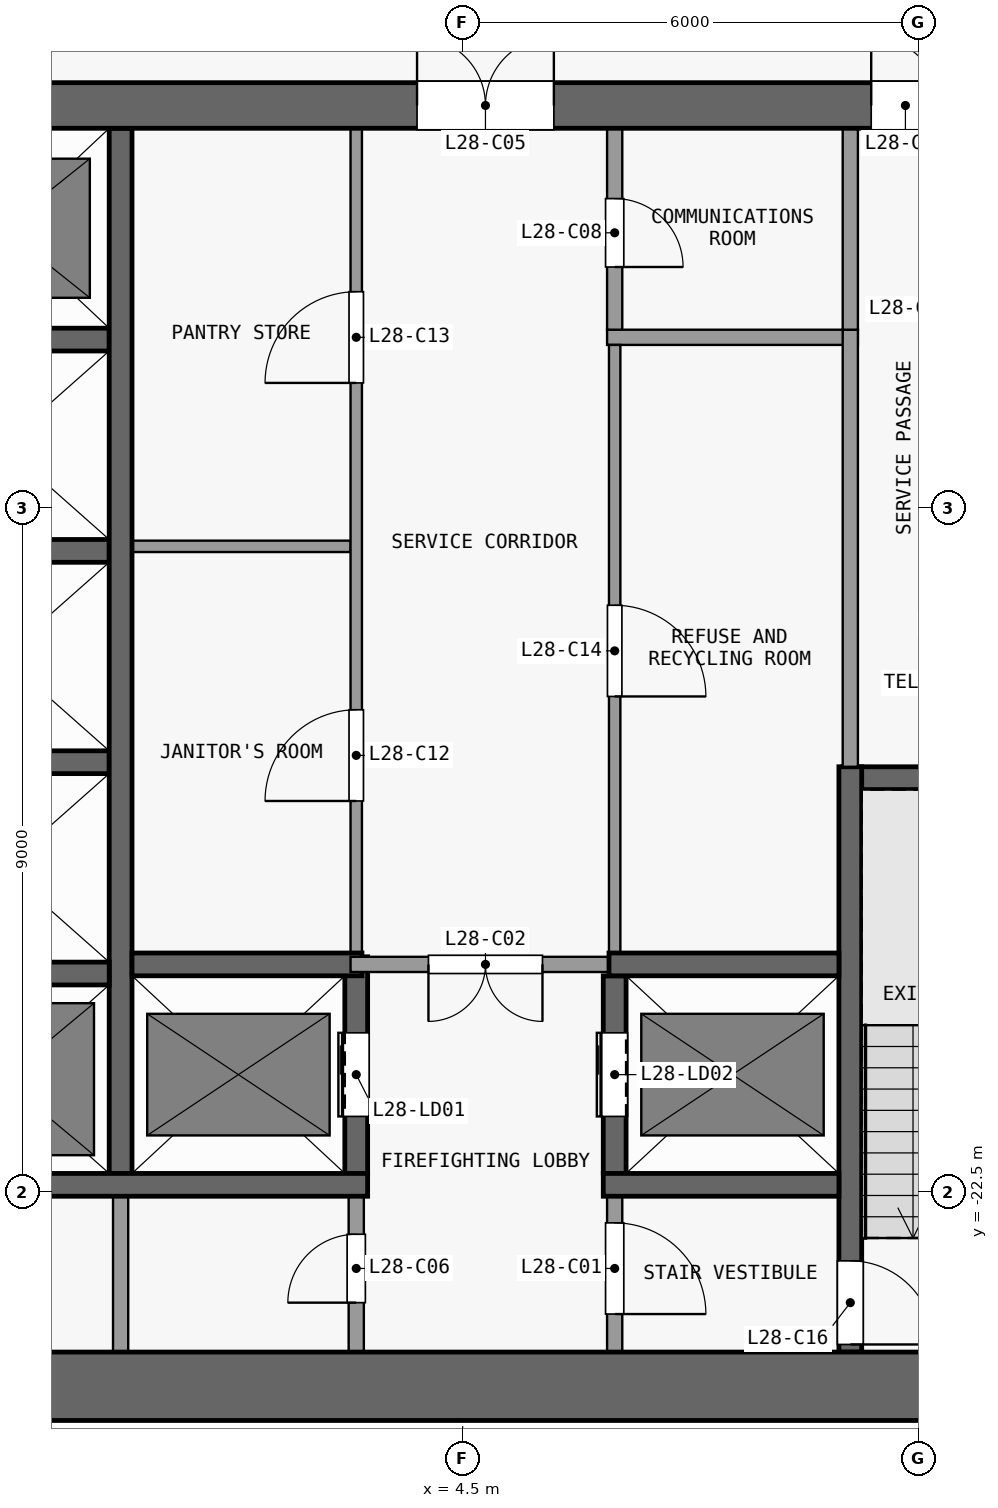
"""IFC4 building model, lengths in metres.
Left out: names, types, materials, properties, quantities, classifications, styles, units other than length and angle.
Written with IfcOpenShell. Run it as: python <this file> out.ifc"""

import sys

from ifc_helpers import new_model, si_unit, direction, frame, frame_2d, origin, place, context, subcontext, project, spatial, rectangle, extrude, element, fill, save


model = new_model("IFC4")
c1 = context("Model", 3, precision=1e-05, world=origin(), true_north=direction((0.0, 1.0)))
c2 = subcontext(c1, "Body", "Model", "MODEL_VIEW")
j1 = project(units=[si_unit("LENGTHUNIT", "METRE"), si_unit("PLANEANGLEUNIT", "RADIAN")], contexts=[c1])
p1 = place(None, origin())
s1 = spatial("IfcSite", under=j1, at=p1, CompositionType="ELEMENT")
p2 = place(p1, origin())
s2 = spatial("IfcBuilding", under=s1, at=p2, CompositionType="ELEMENT")
p3 = place(p2, frame((0.0, 0.0, 113.5)))
s3 = spatial("IfcBuildingStorey", under=s2, at=p3, CompositionType="ELEMENT", Elevation=113.5)
p4 = place(p3, frame((-13.4, -25.05, 0.0), z_axis=(0.0, 0.0, 1.0), x_axis=(1.0, 0.0, 0.0)))
e1 = element("IfcWall", 1, at=p4, inside=s3, PredefinedType="SHEAR", context=c2, shape_type="SweptSolid", body=[
    extrude(rectangle(XDim=26.8, YDim=0.9, at=frame_2d((13.4, 0.0))), origin(), (0.0, 0.0, 1.0), 3.3),
])
p5 = place(p3, frame((-13.4, -8.2, 0.0), z_axis=(0.0, 0.0, 1.0), x_axis=(1.0, 0.0, 0.0)))
e2 = element("IfcWall", 2, at=p5, inside=s3, PredefinedType="SHEAR", context=c2, shape_type="SweptSolid", body=[
    extrude(rectangle(XDim=26.8, YDim=0.6, at=frame_2d((13.4, 0.0))), origin(), (0.0, 0.0, 1.0), 3.3),
])
p6 = place(p5, frame((7.7, 0.0, 0.0)))
e3 = element("IfcOpeningElement", 3, at=p6, cuts=e2, PredefinedType="OPENING", context=c2, shape_type="SweptSolid", body=[
    extrude(rectangle(XDim=1.8, YDim=2.1, at=frame_2d((0.9, 1.05))), frame((0.0, 0.31, 0.0), z_axis=(0.0, -1.0, 0.0), x_axis=(1.0, 0.0, 0.0)), (0.0, 0.0, 1.0), 0.62),
])
p7 = place(p5, frame((17.3, 0.0, 0.0)))
e4 = element("IfcOpeningElement", 4, at=p7, cuts=e2, PredefinedType="OPENING", context=c2, shape_type="SweptSolid", body=[
    extrude(rectangle(XDim=1.8, YDim=2.1, at=frame_2d((0.9, 1.05))), frame((0.0, 0.31, 0.0), z_axis=(0.0, -1.0, 0.0), x_axis=(1.0, 0.0, 0.0)), (0.0, 0.0, 1.0), 0.62),
])
p8 = place(p5, frame((1.625, 0.0, 0.0)))
e5 = element("IfcOpeningElement", 5, at=p8, cuts=e2, PredefinedType="OPENING", context=c2, shape_type="SweptSolid", body=[
    extrude(rectangle(XDim=1.2, YDim=2.1, at=frame_2d((0.6, 1.05))), frame((0.0, 0.31, 0.0), z_axis=(0.0, -1.0, 0.0), x_axis=(1.0, 0.0, 0.0)), (0.0, 0.0, 1.0), 0.62),
])
p9 = place(p5, frame((23.275, 0.0, 0.0)))
e6 = element("IfcOpeningElement", 6, at=p9, cuts=e2, PredefinedType="OPENING", context=c2, shape_type="SweptSolid", body=[
    extrude(rectangle(XDim=0.9, YDim=2.1, at=frame_2d((0.45, 1.05))), frame((0.0, 0.31, 0.0), z_axis=(0.0, -1.0, 0.0), x_axis=(1.0, 0.0, 0.0)), (0.0, 0.0, 1.0), 0.62),
])
p10 = place(p3, frame((-2.95, -22.4, 0.0), z_axis=(0.0, 0.0, 1.0), x_axis=(1.0, 0.0, 0.0)))
e7 = element("IfcWall", 7, at=p10, inside=s3, PredefinedType="SHEAR", context=c2, shape_type="SweptSolid", body=[
    extrude(rectangle(XDim=6.2, YDim=0.3, at=frame_2d((3.1, 0.0))), origin(), (0.0, 0.0, 1.0), 3.3),
])
p11 = place(p3, frame((6.35, -22.4, 0.0), z_axis=(0.0, 0.0, 1.0), x_axis=(1.0, 0.0, 0.0)))
e8 = element("IfcWall", 8, at=p11, inside=s3, PredefinedType="SHEAR", context=c2, shape_type="SweptSolid", body=[
    extrude(rectangle(XDim=3.1, YDim=0.3, at=frame_2d((1.55, 0.0))), origin(), (0.0, 0.0, 1.0), 3.3),
])
p12 = place(p3, frame((-2.95, -19.62, 0.0), z_axis=(0.0, 0.0, 1.0), x_axis=(1.0, 0.0, 0.0)))
e9 = element("IfcWall", 9, at=p12, inside=s3, PredefinedType="SHEAR", context=c2, shape_type="SweptSolid", body=[
    extrude(rectangle(XDim=2.8, YDim=0.3, at=frame_2d((1.4, 0.0))), origin(), (0.0, 0.0, 1.0), 3.3),
])
p13 = place(p3, frame((0.15, -19.5, 0.0), z_axis=(0.0, 0.0, 1.0), x_axis=(1.0, 0.0, 0.0)))
e10 = element("IfcWall", 10, at=p13, inside=s3, PredefinedType="SHEAR", context=c2, shape_type="SweptSolid", body=[
    extrude(rectangle(XDim=3.025, YDim=0.3, at=frame_2d((1.513, 0.0))), origin(), (0.0, 0.0, 1.0), 3.3),
])
p14 = place(p3, frame((6.575, -19.5, 0.0), z_axis=(0.0, 0.0, 1.0), x_axis=(-1.0, 0.0, 0.0)))
e11 = element("IfcWall", 11, at=p14, inside=s3, PredefinedType="PARTITIONING", context=c2, shape_type="SweptSolid", body=[
    extrude(rectangle(XDim=3.55, YDim=0.2, at=frame_2d((1.775, 0.0))), origin(), (0.0, 0.0, 1.0), 3.3),
])
p15 = place(p14, frame((1.025, 0.0, 0.0)))
e12 = element("IfcOpeningElement", 12, at=p15, cuts=e11, PredefinedType="OPENING", context=c2, shape_type="SweptSolid", body=[
    extrude(rectangle(XDim=1.5, YDim=2.1, at=frame_2d((0.75, 1.05))), frame((0.0, 0.11, 0.0), z_axis=(0.0, -1.0, 0.0), x_axis=(1.0, 0.0, 0.0)), (0.0, 0.0, 1.0), 0.22),
])
p16 = place(p3, frame((6.425, -19.5, 0.0), z_axis=(0.0, 0.0, 1.0), x_axis=(1.0, 0.0, 0.0)))
e13 = element("IfcWall", 13, at=p16, inside=s3, PredefinedType="SHEAR", context=c2, shape_type="SweptSolid", body=[
    extrude(rectangle(XDim=3.025, YDim=0.3, at=frame_2d((1.512, 0.0))), origin(), (0.0, 0.0, 1.0), 3.3),
])
p17 = place(p3, frame((9.5, -17.05, 0.0), z_axis=(0.0, 0.0, 1.0), x_axis=(1.0, 0.0, 0.0)))
e14 = element("IfcWall", 14, at=p17, inside=s3, PredefinedType="SHEAR", context=c2, shape_type="SweptSolid", body=[
    extrude(rectangle(XDim=3.1, YDim=0.3, at=frame_2d((1.55, 0.0))), origin(), (0.0, 0.0, 1.0), 3.3),
])
for number, where, z_axis, x_axis in (
    (15, (-2.95, -16.84, 0.0), (0.0, 0.0, 1.0), (1.0, 0.0, 0.0)),
    (16, (-2.95, -14.06, 0.0), (0.0, 0.0, 1.0), (1.0, 0.0, 0.0)),
):
    element("IfcWall", number, at=place(p3, frame(where, z_axis=z_axis, x_axis=x_axis)), inside=s3, PredefinedType="SHEAR", context=c2, shape_type="SweptSolid", body=[
        extrude(rectangle(XDim=2.8, YDim=0.3, at=frame_2d((1.4, 0.0))), origin(), (0.0, 0.0, 1.0), 3.3),
    ])
p18 = place(p3, frame((0.15, -14.0, 0.0), z_axis=(0.0, 0.0, 1.0), x_axis=(1.0, 0.0, 0.0)))
e17 = element("IfcWall", 17, at=p18, inside=s3, PredefinedType="PARTITIONING", context=c2, shape_type="SweptSolid", body=[
    extrude(rectangle(XDim=2.875, YDim=0.15, at=frame_2d((1.438, 0.0))), origin(), (0.0, 0.0, 1.0), 3.3),
])
p19 = place(p3, frame((-2.95, -11.28, 0.0), z_axis=(0.0, 0.0, 1.0), x_axis=(1.0, 0.0, 0.0)))
e18 = element("IfcWall", 18, at=p19, inside=s3, PredefinedType="SHEAR", context=c2, shape_type="SweptSolid", body=[
    extrude(rectangle(XDim=2.8, YDim=0.3, at=frame_2d((1.4, 0.0))), origin(), (0.0, 0.0, 1.0), 3.3),
])
p20 = place(p3, frame((6.4, -11.25, 0.0), z_axis=(0.0, 0.0, 1.0), x_axis=(1.0, 0.0, 0.0)))
e19 = element("IfcWall", 19, at=p20, inside=s3, PredefinedType="PARTITIONING", context=c2, shape_type="SweptSolid", body=[
    extrude(rectangle(XDim=3.3, YDim=0.2, at=frame_2d((1.65, 0.0))), origin(), (0.0, 0.0, 1.0), 3.3),
])
p21 = place(p3, frame((0.0, -24.6, 0.0), z_axis=(0.0, 0.0, 1.0), x_axis=(0.0, 1.0, 0.0)))
e20 = element("IfcWall", 20, at=p21, inside=s3, PredefinedType="PARTITIONING", context=c2, shape_type="SweptSolid", body=[
    extrude(rectangle(XDim=2.05, YDim=0.2, at=frame_2d((1.025, 0.0))), origin(), (0.0, 0.0, 1.0), 3.3),
])
p22 = place(p3, frame((0.0, -22.25, 0.0), z_axis=(0.0, 0.0, 1.0), x_axis=(0.0, 1.0, 0.0)))
e21 = element("IfcWall", 21, at=p22, inside=s3, PredefinedType="SHEAR", context=c2, shape_type="SweptSolid", body=[
    extrude(rectangle(XDim=13.75, YDim=0.3, at=frame_2d((6.875, 0.0))), origin(), (0.0, 0.0, 1.0), 3.3),
])
p23 = place(p3, frame((3.1, -24.6, 0.0), z_axis=(0.0, 0.0, 1.0), x_axis=(0.0, 1.0, 0.0)))
e22 = element("IfcWall", 22, at=p23, inside=s3, PredefinedType="PARTITIONING", context=c2, shape_type="SweptSolid", body=[
    extrude(rectangle(XDim=2.05, YDim=0.2, at=frame_2d((1.025, 0.0))), origin(), (0.0, 0.0, 1.0), 3.3),
])
p24 = place(p23, frame((0.65, 0.0, 0.0)))
e23 = element("IfcOpeningElement", 23, at=p24, cuts=e22, PredefinedType="OPENING", context=c2, shape_type="SweptSolid", body=[
    extrude(rectangle(XDim=0.9, YDim=2.1, at=frame_2d((0.45, 1.05))), frame((0.0, 0.11, 0.0), z_axis=(0.0, -1.0, 0.0), x_axis=(1.0, 0.0, 0.0)), (0.0, 0.0, 1.0), 0.22),
])
p25 = place(p3, frame((3.1, -22.25, 0.0), z_axis=(0.0, 0.0, 1.0), x_axis=(0.0, 1.0, 0.0)))
e24 = element("IfcWall", 24, at=p25, inside=s3, PredefinedType="SHEAR", context=c2, shape_type="SweptSolid", body=[
    extrude(rectangle(XDim=2.85, YDim=0.3, at=frame_2d((1.425, 0.0))), origin(), (0.0, 0.0, 1.0), 3.3),
])
p26 = place(p25, frame((0.75, 0.0, 0.0)))
e25 = element("IfcOpeningElement", 25, at=p26, cuts=e24, PredefinedType="OPENING", context=c2, shape_type="SweptSolid", body=[
    extrude(rectangle(XDim=1.1, YDim=2.1, at=frame_2d((0.55, 1.05))), frame((0.0, 0.16, 0.0), z_axis=(0.0, -1.0, 0.0), x_axis=(1.0, 0.0, 0.0)), (0.0, 0.0, 1.0), 0.32),
])
p27 = place(p3, frame((3.1, -19.4, 0.0), z_axis=(0.0, 0.0, 1.0), x_axis=(0.0, 1.0, 0.0)))
e26 = element("IfcWall", 26, at=p27, inside=s3, PredefinedType="PARTITIONING", context=c2, shape_type="SweptSolid", body=[
    extrude(rectangle(XDim=10.9, YDim=0.15, at=frame_2d((5.45, 0.0))), origin(), (0.0, 0.0, 1.0), 3.3),
])
p28 = place(p27, frame((2.05, 0.0, 0.0)))
e27 = element("IfcOpeningElement", 27, at=p28, cuts=e26, PredefinedType="OPENING", context=c2, shape_type="SweptSolid", body=[
    extrude(rectangle(XDim=1.2, YDim=2.1, at=frame_2d((0.6, 1.05))), frame((0.0, 0.085, 0.0), z_axis=(0.0, -1.0, 0.0), x_axis=(1.0, 0.0, 0.0)), (0.0, 0.0, 1.0), 0.17),
])
p29 = place(p27, frame((7.55, 0.0, 0.0)))
e28 = element("IfcOpeningElement", 28, at=p29, cuts=e26, PredefinedType="OPENING", context=c2, shape_type="SweptSolid", body=[
    extrude(rectangle(XDim=1.2, YDim=2.1, at=frame_2d((0.6, 1.05))), frame((0.0, 0.085, 0.0), z_axis=(0.0, -1.0, 0.0), x_axis=(1.0, 0.0, 0.0)), (0.0, 0.0, 1.0), 0.17),
])
p30 = place(p3, frame((6.5, -22.55, 0.0), z_axis=(0.0, 0.0, 1.0), x_axis=(0.0, -1.0, 0.0)))
e29 = element("IfcWall", 29, at=p30, inside=s3, PredefinedType="PARTITIONING", context=c2, shape_type="SweptSolid", body=[
    extrude(rectangle(XDim=2.05, YDim=0.2, at=frame_2d((1.025, 0.0))), origin(), (0.0, 0.0, 1.0), 3.3),
])
p31 = place(p30, frame((0.35, 0.0, 0.0)))
e30 = element("IfcOpeningElement", 30, at=p31, cuts=e29, PredefinedType="OPENING", context=c2, shape_type="SweptSolid", body=[
    extrude(rectangle(XDim=1.2, YDim=2.1, at=frame_2d((0.6, 1.05))), frame((0.0, 0.11, 0.0), z_axis=(0.0, -1.0, 0.0), x_axis=(1.0, 0.0, 0.0)), (0.0, 0.0, 1.0), 0.22),
])
p32 = place(p3, frame((6.5, -22.25, 0.0), z_axis=(0.0, 0.0, 1.0), x_axis=(0.0, 1.0, 0.0)))
e31 = element("IfcWall", 31, at=p32, inside=s3, PredefinedType="SHEAR", context=c2, shape_type="SweptSolid", body=[
    extrude(rectangle(XDim=2.6, YDim=0.3, at=frame_2d((1.3, 0.0))), origin(), (0.0, 0.0, 1.0), 3.3),
])
p33 = place(p32, frame((0.75, 0.0, 0.0)))
e32 = element("IfcOpeningElement", 32, at=p33, cuts=e31, PredefinedType="OPENING", context=c2, shape_type="SweptSolid", body=[
    extrude(rectangle(XDim=1.1, YDim=2.1, at=frame_2d((0.55, 1.05))), frame((0.0, 0.16, 0.0), z_axis=(0.0, -1.0, 0.0), x_axis=(1.0, 0.0, 0.0)), (0.0, 0.0, 1.0), 0.32),
])
p34 = place(p3, frame((6.5, -11.35, 0.0), z_axis=(0.0, 0.0, 1.0), x_axis=(0.0, -1.0, 0.0)))
e33 = element("IfcWall", 33, at=p34, inside=s3, PredefinedType="PARTITIONING", context=c2, shape_type="SweptSolid", body=[
    extrude(rectangle(XDim=8.0, YDim=0.15, at=frame_2d((4.0, 0.0))), origin(), (0.0, 0.0, 1.0), 3.3),
])
p35 = place(p34, frame((3.425, 0.0, 0.0)))
e34 = element("IfcOpeningElement", 34, at=p35, cuts=e33, PredefinedType="OPENING", context=c2, shape_type="SweptSolid", body=[
    extrude(rectangle(XDim=1.2, YDim=2.1, at=frame_2d((0.6, 1.05))), frame((0.0, 0.085, 0.0), z_axis=(0.0, -1.0, 0.0), x_axis=(1.0, 0.0, 0.0)), (0.0, 0.0, 1.0), 0.17),
])
p36 = place(p3, frame((6.5, -8.5, 0.0), z_axis=(0.0, 0.0, 1.0), x_axis=(0.0, -1.0, 0.0)))
e35 = element("IfcWall", 35, at=p36, inside=s3, PredefinedType="PARTITIONING", context=c2, shape_type="SweptSolid", body=[
    extrude(rectangle(XDim=2.65, YDim=0.2, at=frame_2d((1.325, 0.0))), origin(), (0.0, 0.0, 1.0), 3.3),
])
p37 = place(p36, frame((0.925, 0.0, 0.0)))
e36 = element("IfcOpeningElement", 36, at=p37, cuts=e35, PredefinedType="OPENING", context=c2, shape_type="SweptSolid", body=[
    extrude(rectangle(XDim=0.9, YDim=2.1, at=frame_2d((0.45, 1.05))), frame((0.0, 0.11, 0.0), z_axis=(0.0, -1.0, 0.0), x_axis=(1.0, 0.0, 0.0)), (0.0, 0.0, 1.0), 0.22),
])
p38 = place(p3, frame((9.6, -16.9, 0.0), z_axis=(0.0, 0.0, 1.0), x_axis=(0.0, -1.0, 0.0)))
e37 = element("IfcWall", 37, at=p38, inside=s3, PredefinedType="SHEAR", context=c2, shape_type="SweptSolid", body=[
    extrude(rectangle(XDim=7.7, YDim=0.3, at=frame_2d((3.85, 0.0))), origin(), (0.0, 0.0, 1.0), 3.3),
])
p39 = place(p38, frame((6.5, 0.0, 0.0)))
e38 = element("IfcOpeningElement", 38, at=p39, cuts=e37, PredefinedType="OPENING", context=c2, shape_type="SweptSolid", body=[
    extrude(rectangle(XDim=1.1, YDim=2.1, at=frame_2d((0.55, 1.05))), frame((0.0, 0.16, 0.0), z_axis=(0.0, -1.0, 0.0), x_axis=(1.0, 0.0, 0.0)), (0.0, 0.0, 1.0), 0.32),
])
p40 = place(p3, frame((9.6, -16.9, 0.0), z_axis=(0.0, 0.0, 1.0), x_axis=(0.0, 1.0, 0.0)))
e39 = element("IfcWall", 39, at=p40, inside=s3, PredefinedType="PARTITIONING", context=c2, shape_type="SweptSolid", body=[
    extrude(rectangle(XDim=5.75, YDim=0.2, at=frame_2d((2.875, 0.0))), origin(), (0.0, 0.0, 1.0), 3.3),
])
p41 = place(p3, frame((9.6, -11.15, 0.0), z_axis=(0.0, 0.0, 1.0), x_axis=(0.0, 1.0, 0.0)))
e40 = element("IfcWall", 40, at=p41, inside=s3, PredefinedType="PARTITIONING", context=c2, shape_type="SweptSolid", body=[
    extrude(rectangle(XDim=2.65, YDim=0.2, at=frame_2d((1.325, 0.0))), origin(), (0.0, 0.0, 1.0), 3.3),
])
p42 = place(p26, origin())
e41 = element("IfcDoor", 41, at=p42, inside=s3, OperationType="DOUBLE_DOOR_SLIDING", PredefinedType="DOOR", context=c2, shape_type="SweptSolid", body=[
    extrude(rectangle(XDim=1.1, YDim=2.1, at=frame_2d((0.55, 1.05))), frame((0.0, 0.025, 0.0), z_axis=(0.0, -1.0, 0.0), x_axis=(1.0, 0.0, 0.0)), (0.0, 0.0, 1.0), 0.05),
])
fill(e25, e41)
p43 = place(p33, origin())
e42 = element("IfcDoor", 42, at=p43, inside=s3, OperationType="DOUBLE_DOOR_SLIDING", PredefinedType="DOOR", context=c2, shape_type="SweptSolid", body=[
    extrude(rectangle(XDim=1.1, YDim=2.1, at=frame_2d((0.55, 1.05))), frame((0.0, 0.025, 0.0), z_axis=(0.0, -1.0, 0.0), x_axis=(1.0, 0.0, 0.0)), (0.0, 0.0, 1.0), 0.05),
])
fill(e32, e42)
p44 = place(p31, origin())
e43 = element("IfcDoor", 43, at=p44, inside=s3, OperationType="SINGLE_SWING_RIGHT", PredefinedType="DOOR", context=c2, shape_type="SweptSolid", body=[
    extrude(rectangle(XDim=1.2, YDim=2.1, at=frame_2d((0.6, 1.05))), frame((0.0, 0.025, 0.0), z_axis=(0.0, -1.0, 0.0), x_axis=(1.0, 0.0, 0.0)), (0.0, 0.0, 1.0), 0.05),
])
fill(e30, e43)
p45 = place(p15, origin())
e44 = element("IfcDoor", 44, at=p45, inside=s3, OperationType="DOUBLE_DOOR_SINGLE_SWING", PredefinedType="DOOR", context=c2, shape_type="SweptSolid", body=[
    extrude(rectangle(XDim=1.5, YDim=2.1, at=frame_2d((0.75, 1.05))), frame((0.0, 0.025, 0.0), z_axis=(0.0, -1.0, 0.0), x_axis=(1.0, 0.0, 0.0)), (0.0, 0.0, 1.0), 0.05),
])
fill(e12, e44)
p46 = place(p7, origin())
e45 = element("IfcDoor", 45, at=p46, inside=s3, OperationType="DOUBLE_DOOR_SINGLE_SWING", PredefinedType="DOOR", context=c2, shape_type="SweptSolid", body=[
    extrude(rectangle(XDim=1.8, YDim=2.1, at=frame_2d((0.9, 1.05))), frame((0.0, 0.025, 0.0), z_axis=(0.0, -1.0, 0.0), x_axis=(1.0, 0.0, 0.0)), (0.0, 0.0, 1.0), 0.05),
])
fill(e4, e45)
p47 = place(p24, origin())
e46 = element("IfcDoor", 46, at=p47, inside=s3, OperationType="SINGLE_SWING_LEFT", PredefinedType="DOOR", context=c2, shape_type="SweptSolid", body=[
    extrude(rectangle(XDim=0.9, YDim=2.1, at=frame_2d((0.45, 1.05))), frame((0.0, 0.025, 0.0), z_axis=(0.0, -1.0, 0.0), x_axis=(1.0, 0.0, 0.0)), (0.0, 0.0, 1.0), 0.05),
])
fill(e23, e46)
p48 = place(p37, origin())
e47 = element("IfcDoor", 47, at=p48, inside=s3, OperationType="SINGLE_SWING_RIGHT", PredefinedType="DOOR", context=c2, shape_type="SweptSolid", body=[
    extrude(rectangle(XDim=0.9, YDim=2.1, at=frame_2d((0.45, 1.05))), frame((0.0, 0.025, 0.0), z_axis=(0.0, -1.0, 0.0), x_axis=(1.0, 0.0, 0.0)), (0.0, 0.0, 1.0), 0.05),
])
fill(e36, e47)
p49 = place(p9, origin())
e48 = element("IfcDoor", 48, at=p49, inside=s3, OperationType="SINGLE_SWING_LEFT", PredefinedType="DOOR", context=c2, shape_type="SweptSolid", body=[
    extrude(rectangle(XDim=0.9, YDim=2.1, at=frame_2d((0.45, 1.05))), frame((0.0, 0.025, 0.0), z_axis=(0.0, -1.0, 0.0), x_axis=(1.0, 0.0, 0.0)), (0.0, 0.0, 1.0), 0.05),
])
fill(e6, e48)
p50 = place(p28, origin())
e49 = element("IfcDoor", 49, at=p50, inside=s3, OperationType="SINGLE_SWING_LEFT", PredefinedType="DOOR", context=c2, shape_type="SweptSolid", body=[
    extrude(rectangle(XDim=1.2, YDim=2.1, at=frame_2d((0.6, 1.05))), frame((0.0, 0.025, 0.0), z_axis=(0.0, -1.0, 0.0), x_axis=(1.0, 0.0, 0.0)), (0.0, 0.0, 1.0), 0.05),
])
fill(e27, e49)
p51 = place(p29, origin())
e50 = element("IfcDoor", 50, at=p51, inside=s3, OperationType="SINGLE_SWING_LEFT", PredefinedType="DOOR", context=c2, shape_type="SweptSolid", body=[
    extrude(rectangle(XDim=1.2, YDim=2.1, at=frame_2d((0.6, 1.05))), frame((0.0, 0.025, 0.0), z_axis=(0.0, -1.0, 0.0), x_axis=(1.0, 0.0, 0.0)), (0.0, 0.0, 1.0), 0.05),
])
fill(e28, e50)
p52 = place(p35, origin())
e51 = element("IfcDoor", 51, at=p52, inside=s3, OperationType="SINGLE_SWING_RIGHT", PredefinedType="DOOR", context=c2, shape_type="SweptSolid", body=[
    extrude(rectangle(XDim=1.2, YDim=2.1, at=frame_2d((0.6, 1.05))), frame((0.0, 0.025, 0.0), z_axis=(0.0, -1.0, 0.0), x_axis=(1.0, 0.0, 0.0)), (0.0, 0.0, 1.0), 0.05),
])
fill(e34, e51)
p53 = place(p39, origin())
e52 = element("IfcDoor", 52, at=p53, inside=s3, OperationType="SINGLE_SWING_RIGHT", PredefinedType="DOOR", context=c2, shape_type="SweptSolid", body=[
    extrude(rectangle(XDim=1.1, YDim=2.1, at=frame_2d((0.55, 1.05))), frame((0.0, 0.025, 0.0), z_axis=(0.0, -1.0, 0.0), x_axis=(1.0, 0.0, 0.0)), (0.0, 0.0, 1.0), 0.05),
])
fill(e38, e52)
save(model, sys.argv[1])
